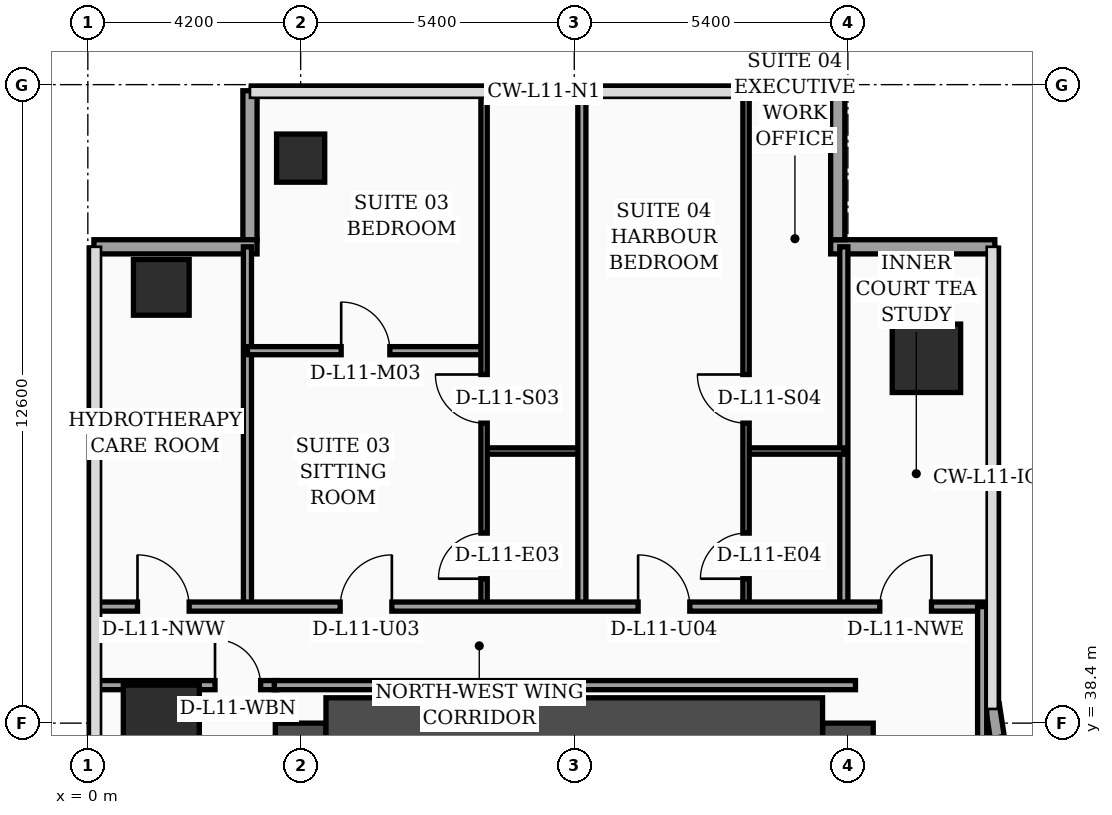
"""IFC4 building model, lengths in metres.
Left out: names, types, materials, properties, quantities, classifications, styles, units other than length and angle.
Written with IfcOpenShell. Run it as: python <this file> out.ifc"""

import sys

from ifc_helpers import new_model, si_unit, direction, frame, frame_2d, origin, origin_2d, place, context, subcontext, project, spatial, rectangle, hollow_rectangle, extrude, element, fill, save


model = new_model("IFC4")
c1 = context("Model", 3, precision=1e-05, world=origin(), true_north=direction((0.0, 1.0)))
c2 = subcontext(c1, "Body", "Model", "MODEL_VIEW")
j1 = project(units=[si_unit("LENGTHUNIT", "METRE"), si_unit("PLANEANGLEUNIT", "RADIAN")], contexts=[c1])
p1 = place(None, origin())
s1 = spatial("IfcSite", under=j1, at=p1, CompositionType="ELEMENT")
p2 = place(p1, origin())
s2 = spatial("IfcBuilding", under=s1, at=p2, CompositionType="ELEMENT")
p3 = place(p2, frame((0.0, 0.0, 50.8)))
s3 = spatial("IfcBuildingStorey", under=s2, at=p3, CompositionType="ELEMENT", Elevation=50.8)
p4 = place(p3, frame((4.2, 16.8, 0.0), z_axis=(0.0, 0.0, 1.0), x_axis=(0.0, 1.0, 0.0)))
e1 = element("IfcWall", 1, at=p4, inside=s3, PredefinedType="SHEAR", context=c2, shape_type="SweptSolid", body=[
    extrude(rectangle(XDim=21.6, YDim=1.0, at=frame_2d((10.8, 0.0))), origin(), (0.0, 0.0, 1.0), 3.56),
])
p5 = place(p3, frame((15.0, 16.8, 0.0), z_axis=(0.0, 0.0, 1.0), x_axis=(0.0, 1.0, 0.0)))
e2 = element("IfcWall", 2, at=p5, inside=s3, PredefinedType="SHEAR", context=c2, shape_type="SweptSolid", body=[
    extrude(rectangle(XDim=21.6, YDim=1.0, at=frame_2d((10.8, 0.0))), origin(), (0.0, 0.0, 1.0), 3.56),
])
p6 = place(p5, frame((8.65, 0.0, 0.0)))
e3 = element("IfcOpeningElement", 3, at=p6, cuts=e2, PredefinedType="OPENING", context=c2, shape_type="SweptSolid", body=[
    extrude(rectangle(XDim=1.1, YDim=2.2, at=frame_2d((0.55, 1.1))), frame((0.0, 0.51, 0.0), z_axis=(0.0, -1.0, 0.0), x_axis=(1.0, 0.0, 0.0)), (0.0, 0.0, 1.0), 1.02),
])
p7 = place(p5, frame((1.25, 0.0, 0.0)))
e4 = element("IfcOpeningElement", 4, at=p7, cuts=e2, PredefinedType="OPENING", context=c2, shape_type="SweptSolid", body=[
    extrude(rectangle(XDim=1.1, YDim=2.2, at=frame_2d((0.55, 1.1))), frame((0.0, 0.51, 0.0), z_axis=(0.0, -1.0, 0.0), x_axis=(1.0, 0.0, 0.0)), (0.0, 0.0, 1.0), 1.02),
])
p8 = place(p5, frame((3.8, 0.0, 0.0)))
e5 = element("IfcOpeningElement", 5, at=p8, cuts=e2, PredefinedType="OPENING", context=c2, shape_type="SweptSolid", body=[
    extrude(rectangle(XDim=1.1, YDim=2.2, at=frame_2d((0.55, 1.1))), frame((0.0, 0.51, 0.0), z_axis=(0.0, -1.0, 0.0), x_axis=(1.0, 0.0, 0.0)), (0.0, 0.0, 1.0), 1.02),
])
p9 = place(p5, frame((6.35, 0.0, 0.0)))
e6 = element("IfcOpeningElement", 6, at=p9, cuts=e2, PredefinedType="OPENING", context=c2, shape_type="SweptSolid", body=[
    extrude(rectangle(XDim=1.1, YDim=2.2, at=frame_2d((0.55, 1.1))), frame((0.0, 0.51, 0.0), z_axis=(0.0, -1.0, 0.0), x_axis=(1.0, 0.0, 0.0)), (0.0, 0.0, 1.0), 1.02),
])
p10 = place(p3, frame((4.7, 38.4, 0.0), z_axis=(0.0, 0.0, 1.0), x_axis=(1.0, 0.0, 0.0)))
e7 = element("IfcWall", 7, at=p10, inside=s3, PredefinedType="SHEAR", context=c2, shape_type="SweptSolid", body=[
    extrude(rectangle(XDim=9.8, YDim=1.0, at=frame_2d((4.9, 0.0))), origin(), (0.0, 0.0, 1.0), 3.56),
])
p11 = place(p3, frame((1.45, 38.4, 0.0), z_axis=(0.0, 0.0, 1.0), x_axis=(1.0, 0.0, 0.0)))
e8 = element("IfcColumn", 8, at=p11, inside=s3, PredefinedType="COLUMN", context=c2, shape_type="SweptSolid", body=[
    extrude(rectangle(XDim=1.5, YDim=1.5, at=origin_2d()), origin(), (0.0, 0.0, 1.0), 3.56),
])
p12 = place(p3, frame((1.45, 47.0, 0.0), z_axis=(0.0, 0.0, 1.0), x_axis=(1.0, 0.0, 0.0)))
e9 = element("IfcColumn", 9, at=p12, inside=s3, PredefinedType="COLUMN", context=c2, shape_type="SweptSolid", body=[
    extrude(hollow_rectangle(XDim=1.1, YDim=1.1, WallThickness=0.045, at=origin_2d()), origin(), (0.0, 0.0, 1.0), 3.56),
])
p13 = place(p3, frame((4.2, 49.55, 0.0), z_axis=(0.0, 0.0, 1.0), x_axis=(1.0, 0.0, 0.0)))
e10 = element("IfcColumn", 10, at=p13, inside=s3, PredefinedType="COLUMN", context=c2, shape_type="SweptSolid", body=[
    extrude(hollow_rectangle(XDim=0.95, YDim=0.95, WallThickness=0.04, at=origin_2d()), origin(), (0.0, 0.0, 1.0), 3.56),
])
p14 = place(p3, frame((16.55, 45.6, 0.0), z_axis=(0.0, 0.0, 1.0), x_axis=(1.0, 0.0, 0.0)))
e11 = element("IfcColumn", 11, at=p14, inside=s3, PredefinedType="COLUMN", context=c2, shape_type="SweptSolid", body=[
    extrude(rectangle(XDim=1.35, YDim=1.35, at=origin_2d()), origin(), (0.0, 0.0, 1.0), 3.56),
])
p15 = place(p3, frame((17.962, 38.03, 0.0), z_axis=(0.0, 0.0, 1.0), x_axis=(-0.15141125477, 0.988470855377, 0.0)))
e12 = element("IfcWall", 12, at=p15, inside=s3, PredefinedType="SOLIDWALL", context=c2, shape_type="SweptSolid", body=[
    extrude(rectangle(XDim=0.739, YDim=0.28, at=frame_2d((0.369, 0.0))), origin(), (0.0, 0.0, 1.0), 3.56),
])
p16 = place(p3, frame((17.9, 47.8, 0.0), z_axis=(0.0, 0.0, 1.0), x_axis=(-1.0, 0.0, 0.0)))
e13 = element("IfcWall", 13, at=p16, inside=s3, PredefinedType="SOLIDWALL", context=c2, shape_type="SweptSolid", body=[
    extrude(rectangle(XDim=3.24, YDim=0.28, at=frame_2d((1.62, 0.0))), origin(), (0.0, 0.0, 1.0), 3.56),
])
p17 = place(p3, frame((14.8, 47.94, 0.0), z_axis=(0.0, 0.0, 1.0), x_axis=(0.0, 1.0, 0.0)))
e14 = element("IfcWall", 14, at=p17, inside=s3, PredefinedType="SOLIDWALL", context=c2, shape_type="SweptSolid", body=[
    extrude(rectangle(XDim=2.94, YDim=0.28, at=frame_2d((1.47, 0.0))), origin(), (0.0, 0.0, 1.0), 3.56),
])
p18 = place(p3, frame((3.2, 50.88, 0.0), z_axis=(0.0, 0.0, 1.0), x_axis=(0.0, -1.0, 0.0)))
e15 = element("IfcWall", 15, at=p18, inside=s3, PredefinedType="SOLIDWALL", context=c2, shape_type="SweptSolid", body=[
    extrude(rectangle(XDim=2.94, YDim=0.28, at=frame_2d((1.47, 0.0))), origin(), (0.0, 0.0, 1.0), 3.04),
])
p19 = place(p3, frame((3.34, 47.8, 0.0), z_axis=(0.0, 0.0, 1.0), x_axis=(-1.0, 0.0, 0.0)))
e16 = element("IfcWall", 16, at=p19, inside=s3, PredefinedType="SOLIDWALL", context=c2, shape_type="SweptSolid", body=[
    extrude(rectangle(XDim=3.22, YDim=0.28, at=frame_2d((1.61, 0.0))), origin(), (0.0, 0.0, 1.0), 3.04),
])
p20 = place(p3, frame((0.08, 39.15, 0.0), z_axis=(0.0, 0.0, 1.0), x_axis=(1.0, 0.0, 0.0)))
e17 = element("IfcWall", 17, at=p20, inside=s3, PredefinedType="PARTITIONING", context=c2, shape_type="SweptSolid", body=[
    extrude(rectangle(XDim=3.65, YDim=0.18, at=frame_2d((1.825, 0.0))), origin(), (0.0, 0.0, 1.0), 2.84),
])
p21 = place(p20, frame((2.43, 0.0, 0.0)))
e18 = element("IfcOpeningElement", 18, at=p21, cuts=e17, PredefinedType="OPENING", context=c2, shape_type="SweptSolid", body=[
    extrude(rectangle(XDim=0.9, YDim=2.15, at=frame_2d((0.45, 1.075))), frame((0.0, 0.1, 0.0), z_axis=(0.0, -1.0, 0.0), x_axis=(1.0, 0.0, 0.0)), (0.0, 0.0, 1.0), 0.2),
])
p22 = place(p3, frame((3.15, 40.7, 0.0), z_axis=(0.0, 0.0, 1.0), x_axis=(0.0, 1.0, 0.0)))
e19 = element("IfcWall", 19, at=p22, inside=s3, PredefinedType="PARTITIONING", context=c2, shape_type="SweptSolid", body=[
    extrude(rectangle(XDim=7.1, YDim=0.16, at=frame_2d((3.55, 0.0))), origin(), (0.0, 0.0, 1.0), 3.14),
])
p23 = place(p3, frame((14.92, 40.7, 0.0), z_axis=(0.0, 0.0, 1.0), x_axis=(0.0, 1.0, 0.0)))
e20 = element("IfcWall", 20, at=p23, inside=s3, PredefinedType="PARTITIONING", context=c2, shape_type="SweptSolid", body=[
    extrude(rectangle(XDim=7.1, YDim=0.16, at=frame_2d((3.55, 0.0))), origin(), (0.0, 0.0, 1.0), 3.04),
])
p24 = place(p3, frame((7.82, 43.77, 0.0), z_axis=(0.0, 0.0, 1.0), x_axis=(1.0, 0.0, 0.0)))
e21 = element("IfcWall", 21, at=p24, inside=s3, PredefinedType="PARTITIONING", context=c2, shape_type="SweptSolid", body=[
    extrude(rectangle(XDim=1.93, YDim=0.125, at=frame_2d((0.965, 0.0))), origin(), (0.0, 0.0, 1.0), 3.56),
])
p25 = place(p3, frame((3.15, 45.75, 0.0), z_axis=(0.0, 0.0, 1.0), x_axis=(1.0, 0.0, 0.0)))
e22 = element("IfcWall", 22, at=p25, inside=s3, PredefinedType="PARTITIONING", context=c2, shape_type="SweptSolid", body=[
    extrude(rectangle(XDim=4.67, YDim=0.16, at=frame_2d((2.335, 0.0))), origin(), (0.0, 0.0, 1.0), 2.84),
])
p26 = place(p25, frame((1.85, 0.0, 0.0)))
e23 = element("IfcOpeningElement", 23, at=p26, cuts=e22, PredefinedType="OPENING", context=c2, shape_type="SweptSolid", body=[
    extrude(rectangle(XDim=0.96, YDim=2.2, at=frame_2d((0.48, 1.1))), frame((0.0, 0.09, 0.0), z_axis=(0.0, -1.0, 0.0), x_axis=(1.0, 0.0, 0.0)), (0.0, 0.0, 1.0), 0.18),
])
p27 = place(p3, frame((7.82, 40.7, 0.0), z_axis=(0.0, 0.0, 1.0), x_axis=(0.0, 1.0, 0.0)))
e24 = element("IfcWall", 24, at=p27, inside=s3, PredefinedType="PARTITIONING", context=c2, shape_type="SweptSolid", body=[
    extrude(rectangle(XDim=10.24, YDim=0.125, at=frame_2d((5.12, 0.0))), origin(), (0.0, 0.0, 1.0), 3.04),
])
p28 = place(p27, frame((0.55, 0.0, 0.0)))
e25 = element("IfcOpeningElement", 25, at=p28, cuts=e24, PredefinedType="OPENING", context=c2, shape_type="SweptSolid", body=[
    extrude(rectangle(XDim=0.9, YDim=2.15, at=frame_2d((0.45, 1.075))), frame((0.0, 0.073, 0.0), z_axis=(0.0, -1.0, 0.0), x_axis=(1.0, 0.0, 0.0)), (0.0, 0.0, 1.0), 0.145),
])
p29 = place(p27, frame((3.62, 0.0, 0.0)))
e26 = element("IfcOpeningElement", 26, at=p29, cuts=e24, PredefinedType="OPENING", context=c2, shape_type="SweptSolid", body=[
    extrude(rectangle(XDim=0.96, YDim=2.2, at=frame_2d((0.48, 1.1))), frame((0.0, 0.073, 0.0), z_axis=(0.0, -1.0, 0.0), x_axis=(1.0, 0.0, 0.0)), (0.0, 0.0, 1.0), 0.145),
])
p30 = place(p3, frame((12.99, 43.77, 0.0), z_axis=(0.0, 0.0, 1.0), x_axis=(1.0, 0.0, 0.0)))
e27 = element("IfcWall", 27, at=p30, inside=s3, PredefinedType="PARTITIONING", context=c2, shape_type="SweptSolid", body=[
    extrude(rectangle(XDim=1.93, YDim=0.125, at=frame_2d((0.965, 0.0))), origin(), (0.0, 0.0, 1.0), 3.56),
])
p31 = place(p3, frame((12.99, 40.7, 0.0), z_axis=(0.0, 0.0, 1.0), x_axis=(0.0, 1.0, 0.0)))
e28 = element("IfcWall", 28, at=p31, inside=s3, PredefinedType="PARTITIONING", context=c2, shape_type="SweptSolid", body=[
    extrude(rectangle(XDim=10.24, YDim=0.125, at=frame_2d((5.12, 0.0))), origin(), (0.0, 0.0, 1.0), 3.04),
])
p32 = place(p31, frame((0.55, 0.0, 0.0)))
e29 = element("IfcOpeningElement", 29, at=p32, cuts=e28, PredefinedType="OPENING", context=c2, shape_type="SweptSolid", body=[
    extrude(rectangle(XDim=0.9, YDim=2.15, at=frame_2d((0.45, 1.075))), frame((0.0, 0.073, 0.0), z_axis=(0.0, -1.0, 0.0), x_axis=(1.0, 0.0, 0.0)), (0.0, 0.0, 1.0), 0.145),
])
p33 = place(p31, frame((3.62, 0.0, 0.0)))
e30 = element("IfcOpeningElement", 30, at=p33, cuts=e28, PredefinedType="OPENING", context=c2, shape_type="SweptSolid", body=[
    extrude(rectangle(XDim=0.96, YDim=2.2, at=frame_2d((0.48, 1.1))), frame((0.0, 0.073, 0.0), z_axis=(0.0, -1.0, 0.0), x_axis=(1.0, 0.0, 0.0)), (0.0, 0.0, 1.0), 0.145),
])
p34 = place(p3, frame((9.75, 40.7, 0.0), z_axis=(0.0, 0.0, 1.0), x_axis=(0.0, 1.0, 0.0)))
e31 = element("IfcWall", 31, at=p34, inside=s3, PredefinedType="PARTITIONING", context=c2, shape_type="SweptSolid", body=[
    extrude(rectangle(XDim=10.24, YDim=0.16, at=frame_2d((5.12, 0.0))), origin(), (0.0, 0.0, 1.0), 3.04),
])
p35 = place(p3, frame((0.08, 40.7, 0.0), z_axis=(0.0, 0.0, 1.0), x_axis=(1.0, 0.0, 0.0)))
e32 = element("IfcWall", 32, at=p35, inside=s3, PredefinedType="PARTITIONING", context=c2, shape_type="SweptSolid", body=[
    extrude(rectangle(XDim=17.77, YDim=0.18, at=frame_2d((8.885, 0.0))), origin(), (0.0, 0.0, 1.0), 2.84),
])
p36 = place(p35, frame((0.9, 0.0, 0.0)))
e33 = element("IfcOpeningElement", 33, at=p36, cuts=e32, PredefinedType="OPENING", context=c2, shape_type="SweptSolid", body=[
    extrude(rectangle(XDim=1.02, YDim=2.2, at=frame_2d((0.51, 1.1))), frame((0.0, 0.1, 0.0), z_axis=(0.0, -1.0, 0.0), x_axis=(1.0, 0.0, 0.0)), (0.0, 0.0, 1.0), 0.2),
])
p37 = place(p35, frame((4.9, 0.0, 0.0)))
e34 = element("IfcOpeningElement", 34, at=p37, cuts=e32, PredefinedType="OPENING", context=c2, shape_type="SweptSolid", body=[
    extrude(rectangle(XDim=1.02, YDim=2.2, at=frame_2d((0.51, 1.1))), frame((0.0, 0.1, 0.0), z_axis=(0.0, -1.0, 0.0), x_axis=(1.0, 0.0, 0.0)), (0.0, 0.0, 1.0), 0.2),
])
p38 = place(p35, frame((10.78, 0.0, 0.0)))
e35 = element("IfcOpeningElement", 35, at=p38, cuts=e32, PredefinedType="OPENING", context=c2, shape_type="SweptSolid", body=[
    extrude(rectangle(XDim=1.02, YDim=2.2, at=frame_2d((0.51, 1.1))), frame((0.0, 0.1, 0.0), z_axis=(0.0, -1.0, 0.0), x_axis=(1.0, 0.0, 0.0)), (0.0, 0.0, 1.0), 0.2),
])
p39 = place(p35, frame((15.55, 0.0, 0.0)))
e36 = element("IfcOpeningElement", 36, at=p39, cuts=e32, PredefinedType="OPENING", context=c2, shape_type="SweptSolid", body=[
    extrude(rectangle(XDim=1.02, YDim=2.2, at=frame_2d((0.51, 1.1))), frame((0.0, 0.1, 0.0), z_axis=(0.0, -1.0, 0.0), x_axis=(1.0, 0.0, 0.0)), (0.0, 0.0, 1.0), 0.2),
])
p40 = place(p3, frame((17.65, 24.3, 0.0), z_axis=(0.0, 0.0, 1.0), x_axis=(0.0, 1.0, 0.0)))
e37 = element("IfcWall", 37, at=p40, inside=s3, PredefinedType="PARTITIONING", context=c2, shape_type="SweptSolid", body=[
    extrude(rectangle(XDim=16.4, YDim=0.18, at=frame_2d((8.2, 0.0))), origin(), (0.0, 0.0, 1.0), 2.84),
])
p41 = place(p3, frame((3.68, 39.15, 0.0), z_axis=(0.0, 0.0, 1.0), x_axis=(1.0, 0.0, 0.0)))
e38 = element("IfcWall", 38, at=p41, inside=s3, PredefinedType="PARTITIONING", context=c2, shape_type="SweptSolid", body=[
    extrude(rectangle(XDim=11.47, YDim=0.18, at=frame_2d((5.735, 0.0))), origin(), (0.0, 0.0, 1.0), 2.84),
])
p42 = place(p21, origin())
e39 = element("IfcDoor", 39, at=p42, inside=s3, OperationType="SINGLE_SWING_LEFT", PredefinedType="DOOR", context=c2, shape_type="SweptSolid", body=[
    extrude(rectangle(XDim=0.9, YDim=2.15, at=frame_2d((0.45, 1.075))), frame((0.0, 0.025, 0.0), z_axis=(0.0, -1.0, 0.0), x_axis=(1.0, 0.0, 0.0)), (0.0, 0.0, 1.0), 0.05),
])
fill(e18, e39)
p43 = place(p26, origin())
e40 = element("IfcDoor", 40, at=p43, inside=s3, OperationType="SINGLE_SWING_LEFT", PredefinedType="DOOR", context=c2, shape_type="SweptSolid", body=[
    extrude(rectangle(XDim=0.96, YDim=2.2, at=frame_2d((0.48, 1.1))), frame((0.0, 0.025, 0.0), z_axis=(0.0, -1.0, 0.0), x_axis=(1.0, 0.0, 0.0)), (0.0, 0.0, 1.0), 0.05),
])
fill(e23, e40)
p44 = place(p28, origin())
e41 = element("IfcDoor", 41, at=p44, inside=s3, OperationType="SINGLE_SWING_LEFT", PredefinedType="DOOR", context=c2, shape_type="SweptSolid", body=[
    extrude(rectangle(XDim=0.9, YDim=2.15, at=frame_2d((0.45, 1.075))), frame((0.0, 0.025, 0.0), z_axis=(0.0, -1.0, 0.0), x_axis=(1.0, 0.0, 0.0)), (0.0, 0.0, 1.0), 0.05),
])
fill(e25, e41)
p45 = place(p29, origin())
e42 = element("IfcDoor", 42, at=p45, inside=s3, OperationType="SINGLE_SWING_RIGHT", PredefinedType="DOOR", context=c2, shape_type="SweptSolid", body=[
    extrude(rectangle(XDim=0.96, YDim=2.2, at=frame_2d((0.48, 1.1))), frame((0.0, 0.025, 0.0), z_axis=(0.0, -1.0, 0.0), x_axis=(1.0, 0.0, 0.0)), (0.0, 0.0, 1.0), 0.05),
])
fill(e26, e42)
p46 = place(p32, origin())
e43 = element("IfcDoor", 43, at=p46, inside=s3, OperationType="SINGLE_SWING_LEFT", PredefinedType="DOOR", context=c2, shape_type="SweptSolid", body=[
    extrude(rectangle(XDim=0.9, YDim=2.15, at=frame_2d((0.45, 1.075))), frame((0.0, 0.025, 0.0), z_axis=(0.0, -1.0, 0.0), x_axis=(1.0, 0.0, 0.0)), (0.0, 0.0, 1.0), 0.05),
])
fill(e29, e43)
p47 = place(p33, origin())
e44 = element("IfcDoor", 44, at=p47, inside=s3, OperationType="SINGLE_SWING_RIGHT", PredefinedType="DOOR", context=c2, shape_type="SweptSolid", body=[
    extrude(rectangle(XDim=0.96, YDim=2.2, at=frame_2d((0.48, 1.1))), frame((0.0, 0.025, 0.0), z_axis=(0.0, -1.0, 0.0), x_axis=(1.0, 0.0, 0.0)), (0.0, 0.0, 1.0), 0.05),
])
fill(e30, e44)
p48 = place(p36, origin())
e45 = element("IfcDoor", 45, at=p48, inside=s3, OperationType="SINGLE_SWING_LEFT", PredefinedType="DOOR", context=c2, shape_type="SweptSolid", body=[
    extrude(rectangle(XDim=1.02, YDim=2.2, at=frame_2d((0.51, 1.1))), frame((0.0, 0.025, 0.0), z_axis=(0.0, -1.0, 0.0), x_axis=(1.0, 0.0, 0.0)), (0.0, 0.0, 1.0), 0.05),
])
fill(e33, e45)
p49 = place(p37, origin())
e46 = element("IfcDoor", 46, at=p49, inside=s3, OperationType="SINGLE_SWING_RIGHT", PredefinedType="DOOR", context=c2, shape_type="SweptSolid", body=[
    extrude(rectangle(XDim=1.02, YDim=2.2, at=frame_2d((0.51, 1.1))), frame((0.0, 0.025, 0.0), z_axis=(0.0, -1.0, 0.0), x_axis=(1.0, 0.0, 0.0)), (0.0, 0.0, 1.0), 0.05),
])
fill(e34, e46)
p50 = place(p38, origin())
e47 = element("IfcDoor", 47, at=p50, inside=s3, OperationType="SINGLE_SWING_LEFT", PredefinedType="DOOR", context=c2, shape_type="SweptSolid", body=[
    extrude(rectangle(XDim=1.02, YDim=2.2, at=frame_2d((0.51, 1.1))), frame((0.0, 0.025, 0.0), z_axis=(0.0, -1.0, 0.0), x_axis=(1.0, 0.0, 0.0)), (0.0, 0.0, 1.0), 0.05),
])
fill(e35, e47)
p51 = place(p39, origin())
e48 = element("IfcDoor", 48, at=p51, inside=s3, OperationType="SINGLE_SWING_RIGHT", PredefinedType="DOOR", context=c2, shape_type="SweptSolid", body=[
    extrude(rectangle(XDim=1.02, YDim=2.2, at=frame_2d((0.51, 1.1))), frame((0.0, 0.025, 0.0), z_axis=(0.0, -1.0, 0.0), x_axis=(1.0, 0.0, 0.0)), (0.0, 0.0, 1.0), 0.05),
])
fill(e36, e48)
save(model, sys.argv[1])
